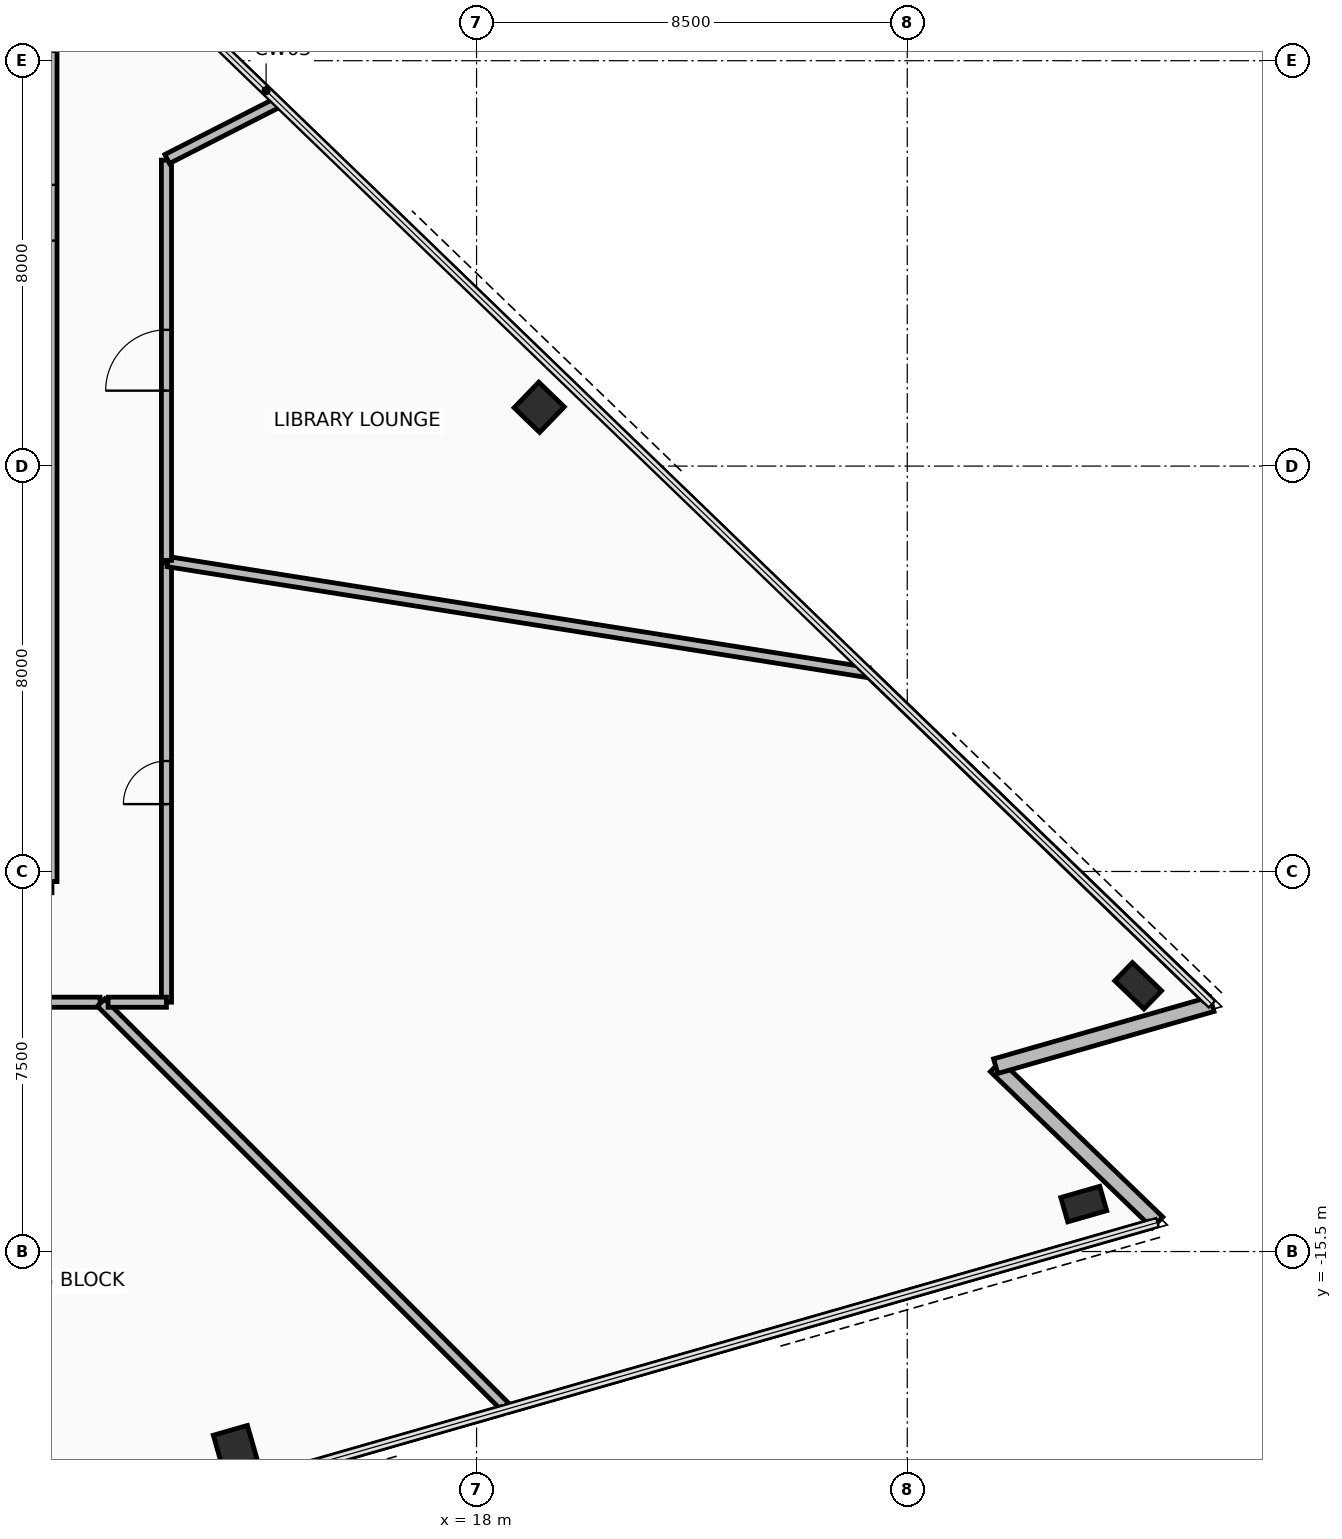
"""IFC4 building model, lengths in metres.
Left out: names, types, materials, properties, quantities, classifications, styles, units other than length and angle.
Written with IfcOpenShell. Run it as: python <this file> out.ifc"""

import sys

from ifc_helpers import new_model, si_unit, direction, frame, frame_2d, origin, origin_2d, place, context, subcontext, project, spatial, rectangle, hollow_rectangle, extrude, element, fill, save


model = new_model("IFC4")
c1 = context("Model", 3, precision=1e-05, world=origin(), true_north=direction((0.0, 1.0)))
c2 = subcontext(c1, "Body", "Model", "MODEL_VIEW")
j1 = project(units=[si_unit("LENGTHUNIT", "METRE"), si_unit("PLANEANGLEUNIT", "RADIAN")], contexts=[c1])
p1 = place(None, origin())
s1 = spatial("IfcSite", under=j1, at=p1, CompositionType="ELEMENT")
p2 = place(p1, origin())
s2 = spatial("IfcBuilding", under=s1, at=p2, CompositionType="ELEMENT")
p3 = place(p2, frame((0.0, 0.0, 107.7)))
s3 = spatial("IfcBuildingStorey", under=s2, at=p3, CompositionType="ELEMENT", Elevation=107.7)
p4 = place(p3, frame((13.238, -19.365, 0.0), z_axis=(0.0, 0.0, 1.0), x_axis=(0.961261695938, 0.275637355817, 0.0)))
e1 = element("IfcColumn", 1, at=p4, inside=s3, PredefinedType="COLUMN", context=c2, shape_type="SweptSolid", body=[
    extrude(hollow_rectangle(XDim=0.7, YDim=0.7, WallThickness=0.04, at=origin_2d()), origin(), (0.0, 0.0, 1.0), 4.75),
])
for number, where, z_axis, x_axis in (
    (2, (29.983, -14.564, 0.0), (0.0, 0.0, 1.0), (0.961, 0.276, 0.0)),
    (3, (31.058, -10.256, 0.0), (0.0, 0.0, 1.0), (-0.719, 0.695, 0.0)),
):
    element("IfcColumn", number, at=place(p3, frame(where, z_axis=z_axis, x_axis=x_axis)), inside=s3, PredefinedType="COLUMN", context=c2, shape_type="SweptSolid", body=[
        extrude(hollow_rectangle(XDim=0.5, YDim=0.8, WallThickness=0.04, at=origin_2d()), origin(), (0.0, 0.0, 1.0), 4.75),
    ])
p5 = place(p3, frame((19.236, 1.16, 0.0), z_axis=(0.0, 0.0, 1.0), x_axis=(-0.719339800339, 0.694658370459, 0.0)))
e4 = element("IfcColumn", 4, at=p5, inside=s3, PredefinedType="COLUMN", context=c2, shape_type="SweptSolid", body=[
    extrude(hollow_rectangle(XDim=0.7, YDim=0.7, WallThickness=0.04, at=origin_2d()), origin(), (0.0, 0.0, 1.0), 4.75),
])
p6 = place(p3, frame((31.439, -14.927, 0.0), z_axis=(0.0, 0.0, 1.0), x_axis=(-0.719317126864, 0.694681848763, 0.0)))
e5 = element("IfcWall", 5, at=p6, inside=s3, PredefinedType="STANDARD", context=c2, shape_type="SweptSolid", body=[
    extrude(rectangle(XDim=4.44, YDim=0.3, at=frame_2d((2.22, 0.0))), origin(), (0.0, 0.0, 1.0), 2.255),
])
p7 = place(p3, frame((28.245, -11.842, 0.0), z_axis=(0.0, 0.0, 1.0), x_axis=(0.961255810825, 0.275657878821, 0.0)))
e6 = element("IfcWall", 6, at=p7, inside=s3, PredefinedType="STANDARD", context=c2, shape_type="SweptSolid", body=[
    extrude(rectangle(XDim=4.44, YDim=0.3, at=frame_2d((2.22, 0.0))), origin(), (0.0, 0.0, 1.0), 2.255),
])
p8 = place(p3, frame((-9.62, -8.32, 0.0), z_axis=(0.0, 0.0, 1.0), x_axis=(1.0, 0.0, 0.0)))
e7 = element("IfcWall", 7, at=p8, inside=s3, PredefinedType="PARTITIONING", context=c2, shape_type="SweptSolid", body=[
    extrude(rectangle(XDim=19.24, YDim=0.2, at=frame_2d((9.62, 0.0))), origin(), (0.0, 0.0, 1.0), 2.355),
])
p9 = place(p8, frame((8.57, 0.0, 0.0)))
e8 = element("IfcOpeningElement", 8, at=p9, cuts=e7, PredefinedType="OPENING", context=c2, shape_type="SweptSolid", body=[
    extrude(rectangle(XDim=0.9, YDim=2.1, at=frame_2d((0.45, 1.05))), frame((0.0, 0.11, 0.0), z_axis=(0.0, -1.0, 0.0), x_axis=(1.0, 0.0, 0.0)), (0.0, 0.0, 1.0), 0.22),
])
p10 = place(p8, frame((15.02, 0.0, 0.0)))
e9 = element("IfcOpeningElement", 9, at=p10, cuts=e7, PredefinedType="OPENING", context=c2, shape_type="SweptSolid", body=[
    extrude(rectangle(XDim=0.9, YDim=2.1, at=frame_2d((0.45, 1.05))), frame((0.0, 0.11, 0.0), z_axis=(0.0, -1.0, 0.0), x_axis=(1.0, 0.0, 0.0)), (0.0, 0.0, 1.0), 0.22),
])
p11 = place(p3, frame((9.62, -8.2, 0.0), z_axis=(0.0, 0.0, 1.0), x_axis=(0.0, 1.0, 0.0)))
e10 = element("IfcWall", 10, at=p11, inside=s3, PredefinedType="PARTITIONING", context=c2, shape_type="SweptSolid", body=[
    extrude(rectangle(XDim=16.4, YDim=0.2, at=frame_2d((8.2, 0.0))), origin(), (0.0, 0.0, 1.0), 2.355),
])
p12 = place(p11, frame((12.65, 0.0, 0.0)))
e11 = element("IfcOpeningElement", 11, at=p12, cuts=e10, PredefinedType="OPENING", context=c2, shape_type="SweptSolid", body=[
    extrude(rectangle(XDim=1.1, YDim=2.15, at=frame_2d((0.55, 1.075))), frame((0.0, 0.11, 0.0), z_axis=(0.0, -1.0, 0.0), x_axis=(1.0, 0.0, 0.0)), (0.0, 0.0, 1.0), 0.22),
])
p13 = place(p3, frame((1.705, -10.58, 0.0), z_axis=(0.0, 0.0, 1.0), x_axis=(1.0, 0.0, 0.0)))
e12 = element("IfcWall", 12, at=p13, inside=s3, PredefinedType="PARTITIONING", context=c2, shape_type="SweptSolid", body=[
    extrude(rectangle(XDim=8.865, YDim=0.2, at=frame_2d((4.432, 0.0))), origin(), (0.0, 0.0, 1.0), 2.755),
])
p14 = place(p13, frame((4.007, 0.0, 0.0)))
e13 = element("IfcOpeningElement", 13, at=p14, cuts=e12, PredefinedType="OPENING", context=c2, shape_type="SweptSolid", body=[
    extrude(rectangle(XDim=0.85, YDim=2.1, at=frame_2d((0.425, 1.05))), frame((0.0, 0.11, 0.0), z_axis=(0.0, -1.0, 0.0), x_axis=(1.0, 0.0, 0.0)), (0.0, 0.0, 1.0), 0.22),
])
p15 = place(p3, frame((10.587, -10.587, 0.0), z_axis=(0.0, 0.0, 1.0), x_axis=(0.707106781187, -0.707106781187, 0.0)))
e14 = element("IfcWall", 14, at=p15, inside=s3, PredefinedType="PARTITIONING", context=c2, shape_type="SweptSolid", body=[
    extrude(rectangle(XDim=11.34, YDim=0.2, at=frame_2d((5.67, 0.0))), origin(), (0.0, 0.0, 1.0), 2.255),
])
p16 = place(p3, frame((18.491, -18.639, 0.0), z_axis=(0.0, 0.0, 1.0), x_axis=(-0.961263863121, -0.275629797842, 0.0)))
e15 = element("IfcWall", 15, at=p16, inside=s3, PredefinedType="PARTITIONING", context=c2, shape_type="SweptSolid", body=[
    extrude(rectangle(XDim=15.434, YDim=0.15, at=frame_2d((7.717, 0.0))), origin(), (0.0, 0.0, 1.0), 4.56),
])
p17 = place(p3, frame((11.88, -10.579, 0.0), z_axis=(0.0, 0.0, 1.0), x_axis=(0.0, 1.0, 0.0)))
e16 = element("IfcWall", 16, at=p17, inside=s3, PredefinedType="PARTITIONING", context=c2, shape_type="SweptSolid", body=[
    extrude(rectangle(XDim=8.668, YDim=0.2, at=frame_2d((4.334, 0.0))), origin(), (0.0, 0.0, 1.0), 2.355),
])
p18 = place(p17, frame((3.909, 0.0, 0.0)))
e17 = element("IfcOpeningElement", 17, at=p18, cuts=e16, PredefinedType="OPENING", context=c2, shape_type="SweptSolid", body=[
    extrude(rectangle(XDim=0.85, YDim=2.1, at=frame_2d((0.425, 1.05))), frame((0.0, 0.11, 0.0), z_axis=(0.0, -1.0, 0.0), x_axis=(1.0, 0.0, 0.0)), (0.0, 0.0, 1.0), 0.22),
])
p19 = place(p3, frame((11.909, -1.886, 0.0), z_axis=(0.0, 0.0, 1.0), x_axis=(0.987688165626, -0.156435569746, 0.0)))
e18 = element("IfcWall", 18, at=p19, inside=s3, PredefinedType="PARTITIONING", context=c2, shape_type="SweptSolid", body=[
    extrude(rectangle(XDim=13.994, YDim=0.2, at=frame_2d((6.997, 0.0))), origin(), (0.0, 0.0, 1.0), 2.255),
])
p20 = place(p3, frame((25.744, -4.082, 0.0), z_axis=(0.0, 0.0, 1.0), x_axis=(0.719337654084, -0.694660592964, 0.0)))
e19 = element("IfcWall", 19, at=p20, inside=s3, PredefinedType="PARTITIONING", context=c2, shape_type="SweptSolid", body=[
    extrude(rectangle(XDim=9.23, YDim=0.15, at=frame_2d((4.615, 0.0))), origin(), (0.0, 0.0, 1.0), 2.355),
])
p21 = place(p3, frame((31.267, -14.976, 0.0), z_axis=(0.0, 0.0, 1.0), x_axis=(-0.961262306809, -0.275635225449, 0.0)))
e20 = element("IfcWall", 20, at=p21, inside=s3, PredefinedType="PARTITIONING", context=c2, shape_type="SweptSolid", body=[
    extrude(rectangle(XDim=13.156, YDim=0.15, at=frame_2d((6.578, 0.0))), origin(), (0.0, 0.0, 1.0), 4.56),
])
p22 = place(p3, frame((10.729, -10.58, 0.0), z_axis=(0.0, 0.0, 1.0), x_axis=(1.0, 0.0, 0.0)))
e21 = element("IfcWall", 21, at=p22, inside=s3, PredefinedType="PARTITIONING", context=c2, shape_type="SweptSolid", body=[
    extrude(rectangle(XDim=1.151, YDim=0.2, at=frame_2d((0.575, 0.0))), origin(), (0.0, 0.0, 1.0), 2.755),
])
p23 = place(p3, frame((11.88, -1.86, 0.0), z_axis=(0.0, 0.0, 1.0), x_axis=(0.0, 1.0, 0.0)))
e22 = element("IfcWall", 22, at=p23, inside=s3, PredefinedType="PARTITIONING", context=c2, shape_type="SweptSolid", body=[
    extrude(rectangle(XDim=7.898, YDim=0.2, at=frame_2d((3.949, 0.0))), origin(), (0.0, 0.0, 1.0), 2.755),
])
p24 = place(p23, frame((3.349, 0.0, 0.0)))
e23 = element("IfcOpeningElement", 23, at=p24, cuts=e22, PredefinedType="OPENING", context=c2, shape_type="SweptSolid", body=[
    extrude(rectangle(XDim=1.2, YDim=2.15, at=frame_2d((0.6, 1.075))), frame((0.0, 0.11, 0.0), z_axis=(0.0, -1.0, 0.0), x_axis=(1.0, 0.0, 0.0)), (0.0, 0.0, 1.0), 0.22),
])
p25 = place(p3, frame((11.894, 6.06, 0.0), z_axis=(0.0, 0.0, 1.0), x_axis=(0.891002108133, 0.453999166633, 0.0)))
e24 = element("IfcWall", 24, at=p25, inside=s3, PredefinedType="PARTITIONING", context=c2, shape_type="SweptSolid", body=[
    extrude(rectangle(XDim=2.442, YDim=0.2, at=frame_2d((1.221, 0.0))), origin(), (0.0, 0.0, 1.0), 2.255),
])
p26 = place(p12, frame((1.1, 0.0, 0.0), z_axis=(0.0, 0.0, 1.0), x_axis=(-1.0, 0.0, 0.0)))
e25 = element("IfcDoor", 25, at=p26, inside=s3, OperationType="SINGLE_SWING_LEFT", PredefinedType="DOOR", context=c2, shape_type="SweptSolid", body=[
    extrude(rectangle(XDim=1.1, YDim=2.15, at=frame_2d((0.55, 1.075))), frame((0.0, 0.025, 0.0), z_axis=(0.0, -1.0, 0.0), x_axis=(1.0, 0.0, 0.0)), (0.0, 0.0, 1.0), 0.05),
])
fill(e11, e25)
p27 = place(p18, origin())
e26 = element("IfcDoor", 26, at=p27, inside=s3, OperationType="SINGLE_SWING_RIGHT", PredefinedType="DOOR", context=c2, shape_type="SweptSolid", body=[
    extrude(rectangle(XDim=0.85, YDim=2.1, at=frame_2d((0.425, 1.05))), frame((0.0, 0.025, 0.0), z_axis=(0.0, -1.0, 0.0), x_axis=(1.0, 0.0, 0.0)), (0.0, 0.0, 1.0), 0.05),
])
fill(e17, e26)
p28 = place(p24, origin())
e27 = element("IfcDoor", 27, at=p28, inside=s3, OperationType="SINGLE_SWING_LEFT", PredefinedType="DOOR", context=c2, shape_type="SweptSolid", body=[
    extrude(rectangle(XDim=1.2, YDim=2.15, at=frame_2d((0.6, 1.075))), frame((0.0, 0.025, 0.0), z_axis=(0.0, -1.0, 0.0), x_axis=(1.0, 0.0, 0.0)), (0.0, 0.0, 1.0), 0.05),
])
fill(e23, e27)
save(model, sys.argv[1])
